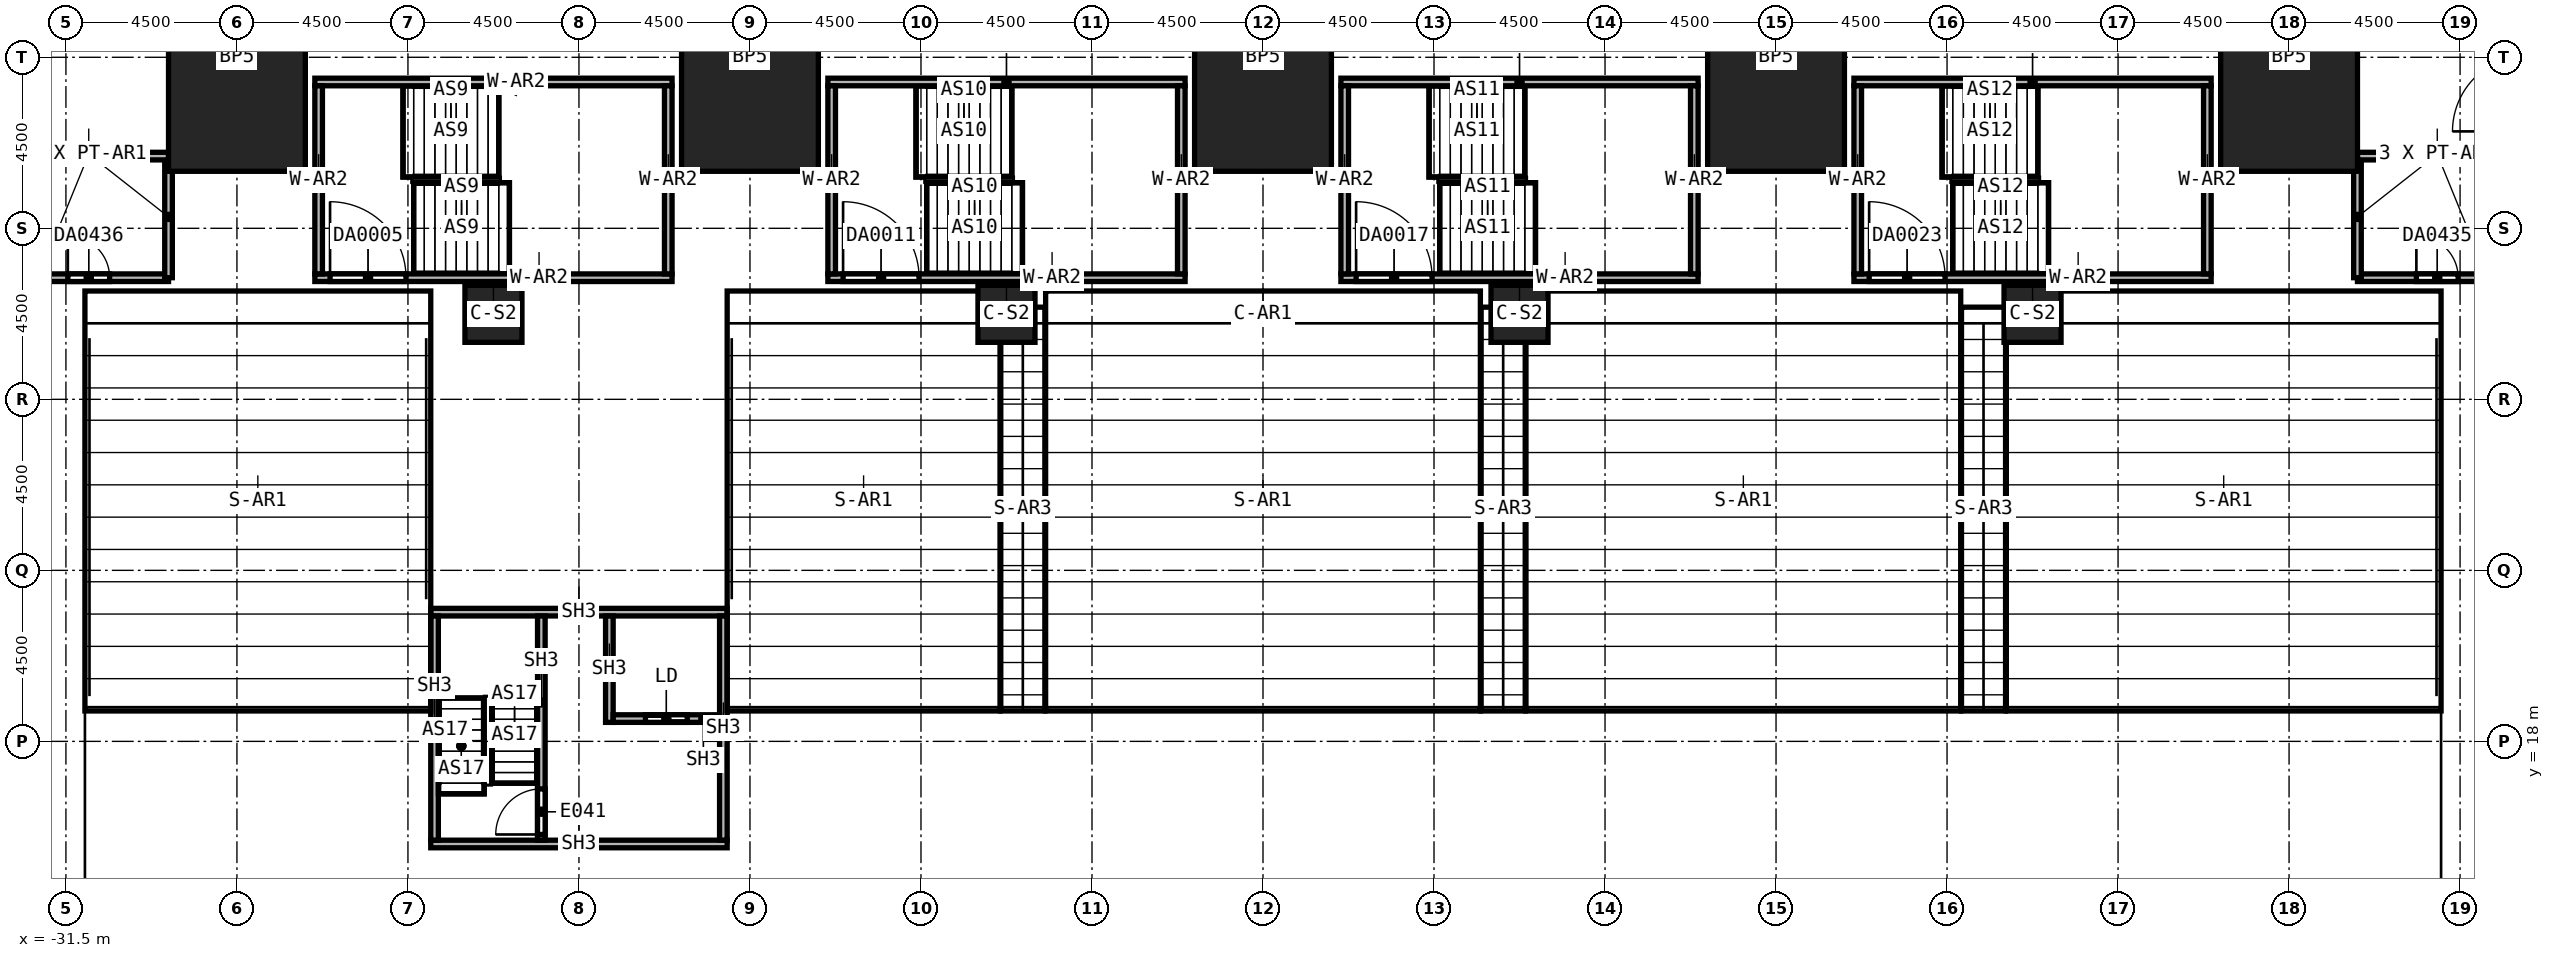
"""IFC4 building model, lengths in metres.
Left out: names, types, materials, properties, quantities, classifications, styles, units other than length and angle.
Written with IfcOpenShell. Run it as: python <this file> out.ifc"""

import sys

from ifc_helpers import new_model, si_unit, direction, frame, frame_2d, origin, origin_2d, place, context, subcontext, project, spatial, rectangle, hollow_rectangle, extrude, element, fill, save


model = new_model("IFC4")
c1 = context("Model", 3, precision=1e-05, world=origin(), true_north=direction((0.0, 1.0)))
c2 = subcontext(c1, "Body", "Model", "MODEL_VIEW")
j1 = project(units=[si_unit("LENGTHUNIT", "METRE"), si_unit("PLANEANGLEUNIT", "RADIAN")], contexts=[c1])
p1 = place(None, origin())
s1 = spatial("IfcSite", under=j1, at=p1, CompositionType="ELEMENT")
p2 = place(p1, origin())
s2 = spatial("IfcBuilding", under=s1, at=p2, CompositionType="ELEMENT")
p3 = place(p2, frame((0.0, 0.0, 31.0)))
s3 = spatial("IfcBuildingStorey", under=s2, at=p3, CompositionType="ELEMENT", Elevation=31.0)
for number, where, z_axis, x_axis in (
    (1, (-27.0, 36.0, 0.0), (0.0, 0.0, 1.0), (1.0, 0.0, 0.0)),
    (2, (-13.5, 36.0, 0.0), (0.0, 0.0, 1.0), (1.0, 0.0, 0.0)),
    (3, (0.0, 36.0, 0.0), (0.0, 0.0, 1.0), (1.0, 0.0, 0.0)),
    (4, (13.5, 36.0, 0.0), (0.0, 0.0, 1.0), (1.0, 0.0, 0.0)),
    (5, (27.0, 36.0, 0.0), (0.0, 0.0, 1.0), (1.0, 0.0, 0.0)),
):
    element("IfcColumn", number, at=place(p3, frame(where, z_axis=z_axis, x_axis=x_axis)), inside=s3, PredefinedType="COLUMN", context=c2, shape_type="SweptSolid", body=[
        extrude(rectangle(XDim=3.6, YDim=6.0, at=origin_2d()), origin(), (0.0, 0.0, 1.0), 6.0),
    ])
for number, where, z_axis, x_axis in (
    (6, (-20.25, 29.25, 0.0), (0.0, 0.0, 1.0), (1.0, 0.0, 0.0)),
    (7, (-6.75, 29.25, 0.0), (0.0, 0.0, 1.0), (1.0, 0.0, 0.0)),
    (8, (6.75, 29.25, 0.0), (0.0, 0.0, 1.0), (1.0, 0.0, 0.0)),
    (9, (20.25, 29.25, 0.0), (0.0, 0.0, 1.0), (1.0, 0.0, 0.0)),
):
    element("IfcColumn", number, at=place(p3, frame(where, z_axis=z_axis, x_axis=x_axis)), inside=s3, PredefinedType="COLUMN", context=c2, shape_type="SweptSolid", body=[
        extrude(rectangle(XDim=1.5, YDim=1.5, at=origin_2d()), origin(), (0.0, 0.0, 1.0), 6.0),
    ])
for number, where, z_axis, x_axis in (
    (10, (-21.9, 15.3, 0.0), (0.0, 0.0, 1.0), (1.0, 0.0, 0.0)),
    (11, (-21.9, 21.4, 0.0), (0.0, 0.0, 1.0), (1.0, 0.0, 0.0)),
):
    element("IfcWall", number, at=place(p3, frame(where, z_axis=z_axis, x_axis=x_axis)), inside=s3, PredefinedType="SOLIDWALL", context=c2, shape_type="SweptSolid", body=[
        extrude(rectangle(XDim=7.8, YDim=0.2, at=frame_2d((3.9, 0.0))), origin(), (0.0, 0.0, 1.0), 5.7),
    ])
for number, where, z_axis, x_axis in (
    (12, (-21.8, 15.4, 0.0), (0.0, 0.0, 1.0), (0.0, 1.0, 0.0)),
    (13, (-14.2, 15.4, 0.0), (0.0, 0.0, 1.0), (0.0, 1.0, 0.0)),
):
    element("IfcWall", number, at=place(p3, frame(where, z_axis=z_axis, x_axis=x_axis)), inside=s3, PredefinedType="SOLIDWALL", context=c2, shape_type="SweptSolid", body=[
        extrude(rectangle(XDim=5.9, YDim=0.2, at=frame_2d((2.95, 0.0))), origin(), (0.0, 0.0, 1.0), 5.7),
    ])
p4 = place(p3, frame((-18.99, 15.4, 0.0), z_axis=(0.0, 0.0, 1.0), x_axis=(0.0, 1.0, 0.0)))
e14 = element("IfcWall", 14, at=p4, inside=s3, PredefinedType="SOLIDWALL", context=c2, shape_type="SweptSolid", body=[
    extrude(rectangle(XDim=5.9, YDim=0.2, at=frame_2d((2.95, 0.0))), origin(), (0.0, 0.0, 1.0), 5.7),
])
p5 = place(p4, frame((0.15, 0.0, 0.0)))
e15 = element("IfcOpeningElement", 15, at=p5, cuts=e14, PredefinedType="OPENING", context=c2, shape_type="SweptSolid", body=[
    extrude(rectangle(XDim=1.2, YDim=2.1, at=frame_2d((0.6, 1.05))), frame((0.0, 0.1, 0.0), z_axis=(0.0, -1.0, 0.0), x_axis=(1.0, 0.0, 0.0)), (0.0, 0.0, 1.0), 0.2),
])
p6 = place(p3, frame((-17.2, 18.5, 0.0), z_axis=(0.0, 0.0, 1.0), x_axis=(0.0, 1.0, 0.0)))
e16 = element("IfcWall", 16, at=p6, inside=s3, PredefinedType="SOLIDWALL", context=c2, shape_type="SweptSolid", body=[
    extrude(rectangle(XDim=2.8, YDim=0.2, at=frame_2d((1.4, 0.0))), origin(), (0.0, 0.0, 1.0), 5.7),
])
p7 = place(p3, frame((-17.1, 18.6, 0.0), z_axis=(0.0, 0.0, 1.0), x_axis=(1.0, 0.0, 0.0)))
e17 = element("IfcWall", 17, at=p7, inside=s3, PredefinedType="SOLIDWALL", context=c2, shape_type="SweptSolid", body=[
    extrude(rectangle(XDim=2.8, YDim=0.2, at=frame_2d((1.4, 0.0))), origin(), (0.0, 0.0, 1.0), 5.7),
])
p8 = place(p7, frame((0.85, 0.0, 0.0)))
e18 = element("IfcOpeningElement", 18, at=p8, cuts=e17, PredefinedType="OPENING", context=c2, shape_type="SweptSolid", body=[
    extrude(rectangle(XDim=1.1, YDim=2.1, at=frame_2d((0.55, 1.05))), frame((0.0, 0.1, 0.0), z_axis=(0.0, -1.0, 0.0), x_axis=(1.0, 0.0, 0.0)), (0.0, 0.0, 1.0), 0.2),
])
p9 = place(p3, frame((0.0, 29.255, 0.0), z_axis=(0.0, 0.0, 1.0), x_axis=(1.0, 0.0, 0.0)))
e19 = element("IfcColumn", 19, at=p9, inside=s3, PredefinedType="COLUMN", context=c2, shape_type="SweptSolid", body=[
    extrude(hollow_rectangle(XDim=0.5, YDim=0.6, WallThickness=0.03, at=origin_2d()), origin(), (0.0, 0.0, 1.0), 5.7),
])
p10 = place(p3, frame((-24.95, 30.2, 0.0), z_axis=(0.0, 0.0, 1.0), x_axis=(1.0, 0.0, 0.0)))
e20 = element("IfcWall", 20, at=p10, inside=s3, PredefinedType="SOLIDWALL", context=c2, shape_type="SweptSolid", body=[
    extrude(rectangle(XDim=9.4, YDim=0.2, at=frame_2d((4.7, 0.0))), origin(), (0.0, 0.0, 1.0), 6.0),
])
p11 = place(p10, frame((0.4, 0.0, 0.0)))
e21 = element("IfcOpeningElement", 21, at=p11, cuts=e20, PredefinedType="OPENING", context=c2, shape_type="SweptSolid", body=[
    extrude(rectangle(XDim=2.0, YDim=2.4, at=frame_2d((1.0, 1.2))), frame((0.0, 0.1, 0.0), z_axis=(0.0, -1.0, 0.0), x_axis=(1.0, 0.0, 0.0)), (0.0, 0.0, 1.0), 0.2),
])
p12 = place(p3, frame((-24.95, 35.35, 0.0), z_axis=(0.0, 0.0, 1.0), x_axis=(1.0, 0.0, 0.0)))
e22 = element("IfcWall", 22, at=p12, inside=s3, PredefinedType="SOLIDWALL", context=c2, shape_type="SweptSolid", body=[
    extrude(rectangle(XDim=9.4, YDim=0.2, at=frame_2d((4.7, 0.0))), origin(), (0.0, 0.0, 1.0), 6.0),
])
for number, where, z_axis, x_axis in (
    (23, (-24.85, 30.3, 0.0), (0.0, 0.0, 1.0), (0.0, 1.0, 0.0)),
    (24, (-15.65, 30.3, 0.0), (0.0, 0.0, 1.0), (0.0, 1.0, 0.0)),
):
    element("IfcWall", number, at=place(p3, frame(where, z_axis=z_axis, x_axis=x_axis)), inside=s3, PredefinedType="SOLIDWALL", context=c2, shape_type="SweptSolid", body=[
        extrude(rectangle(XDim=4.95, YDim=0.2, at=frame_2d((2.475, 0.0))), origin(), (0.0, 0.0, 1.0), 6.0),
    ])
p13 = place(p3, frame((-11.45, 30.2, 0.0), z_axis=(0.0, 0.0, 1.0), x_axis=(1.0, 0.0, 0.0)))
e25 = element("IfcWall", 25, at=p13, inside=s3, PredefinedType="SOLIDWALL", context=c2, shape_type="SweptSolid", body=[
    extrude(rectangle(XDim=9.4, YDim=0.2, at=frame_2d((4.7, 0.0))), origin(), (0.0, 0.0, 1.0), 6.0),
])
p14 = place(p13, frame((0.4, 0.0, 0.0)))
e26 = element("IfcOpeningElement", 26, at=p14, cuts=e25, PredefinedType="OPENING", context=c2, shape_type="SweptSolid", body=[
    extrude(rectangle(XDim=2.0, YDim=2.4, at=frame_2d((1.0, 1.2))), frame((0.0, 0.1, 0.0), z_axis=(0.0, -1.0, 0.0), x_axis=(1.0, 0.0, 0.0)), (0.0, 0.0, 1.0), 0.2),
])
p15 = place(p3, frame((-11.45, 35.35, 0.0), z_axis=(0.0, 0.0, 1.0), x_axis=(1.0, 0.0, 0.0)))
e27 = element("IfcWall", 27, at=p15, inside=s3, PredefinedType="SOLIDWALL", context=c2, shape_type="SweptSolid", body=[
    extrude(rectangle(XDim=9.4, YDim=0.2, at=frame_2d((4.7, 0.0))), origin(), (0.0, 0.0, 1.0), 6.0),
])
for number, where, z_axis, x_axis in (
    (28, (-11.35, 30.3, 0.0), (0.0, 0.0, 1.0), (0.0, 1.0, 0.0)),
    (29, (-2.15, 30.3, 0.0), (0.0, 0.0, 1.0), (0.0, 1.0, 0.0)),
):
    element("IfcWall", number, at=place(p3, frame(where, z_axis=z_axis, x_axis=x_axis)), inside=s3, PredefinedType="SOLIDWALL", context=c2, shape_type="SweptSolid", body=[
        extrude(rectangle(XDim=4.95, YDim=0.2, at=frame_2d((2.475, 0.0))), origin(), (0.0, 0.0, 1.0), 6.0),
    ])
p16 = place(p3, frame((2.05, 30.2, 0.0), z_axis=(0.0, 0.0, 1.0), x_axis=(1.0, 0.0, 0.0)))
e30 = element("IfcWall", 30, at=p16, inside=s3, PredefinedType="SOLIDWALL", context=c2, shape_type="SweptSolid", body=[
    extrude(rectangle(XDim=9.4, YDim=0.2, at=frame_2d((4.7, 0.0))), origin(), (0.0, 0.0, 1.0), 6.0),
])
p17 = place(p16, frame((0.4, 0.0, 0.0)))
e31 = element("IfcOpeningElement", 31, at=p17, cuts=e30, PredefinedType="OPENING", context=c2, shape_type="SweptSolid", body=[
    extrude(rectangle(XDim=2.0, YDim=2.4, at=frame_2d((1.0, 1.2))), frame((0.0, 0.1, 0.0), z_axis=(0.0, -1.0, 0.0), x_axis=(1.0, 0.0, 0.0)), (0.0, 0.0, 1.0), 0.2),
])
p18 = place(p3, frame((2.05, 35.35, 0.0), z_axis=(0.0, 0.0, 1.0), x_axis=(1.0, 0.0, 0.0)))
e32 = element("IfcWall", 32, at=p18, inside=s3, PredefinedType="SOLIDWALL", context=c2, shape_type="SweptSolid", body=[
    extrude(rectangle(XDim=9.4, YDim=0.2, at=frame_2d((4.7, 0.0))), origin(), (0.0, 0.0, 1.0), 6.0),
])
for number, where, z_axis, x_axis in (
    (33, (2.15, 30.3, 0.0), (0.0, 0.0, 1.0), (0.0, 1.0, 0.0)),
    (34, (11.35, 30.3, 0.0), (0.0, 0.0, 1.0), (0.0, 1.0, 0.0)),
):
    element("IfcWall", number, at=place(p3, frame(where, z_axis=z_axis, x_axis=x_axis)), inside=s3, PredefinedType="SOLIDWALL", context=c2, shape_type="SweptSolid", body=[
        extrude(rectangle(XDim=4.95, YDim=0.2, at=frame_2d((2.475, 0.0))), origin(), (0.0, 0.0, 1.0), 6.0),
    ])
p19 = place(p3, frame((15.55, 30.2, 0.0), z_axis=(0.0, 0.0, 1.0), x_axis=(1.0, 0.0, 0.0)))
e35 = element("IfcWall", 35, at=p19, inside=s3, PredefinedType="SOLIDWALL", context=c2, shape_type="SweptSolid", body=[
    extrude(rectangle(XDim=9.4, YDim=0.2, at=frame_2d((4.7, 0.0))), origin(), (0.0, 0.0, 1.0), 6.0),
])
p20 = place(p19, frame((0.4, 0.0, 0.0)))
e36 = element("IfcOpeningElement", 36, at=p20, cuts=e35, PredefinedType="OPENING", context=c2, shape_type="SweptSolid", body=[
    extrude(rectangle(XDim=2.0, YDim=2.4, at=frame_2d((1.0, 1.2))), frame((0.0, 0.1, 0.0), z_axis=(0.0, -1.0, 0.0), x_axis=(1.0, 0.0, 0.0)), (0.0, 0.0, 1.0), 0.2),
])
p21 = place(p3, frame((15.55, 35.35, 0.0), z_axis=(0.0, 0.0, 1.0), x_axis=(1.0, 0.0, 0.0)))
e37 = element("IfcWall", 37, at=p21, inside=s3, PredefinedType="SOLIDWALL", context=c2, shape_type="SweptSolid", body=[
    extrude(rectangle(XDim=9.4, YDim=0.2, at=frame_2d((4.7, 0.0))), origin(), (0.0, 0.0, 1.0), 6.0),
])
for number, where, z_axis, x_axis in (
    (38, (15.65, 30.3, 0.0), (0.0, 0.0, 1.0), (0.0, 1.0, 0.0)),
    (39, (24.85, 30.3, 0.0), (0.0, 0.0, 1.0), (0.0, 1.0, 0.0)),
):
    element("IfcWall", number, at=place(p3, frame(where, z_axis=z_axis, x_axis=x_axis)), inside=s3, PredefinedType="SOLIDWALL", context=c2, shape_type="SweptSolid", body=[
        extrude(rectangle(XDim=4.95, YDim=0.2, at=frame_2d((2.475, 0.0))), origin(), (0.0, 0.0, 1.0), 6.0),
    ])
p22 = place(p3, frame((28.8, 30.2, 0.0), z_axis=(0.0, 0.0, 1.0), x_axis=(1.0, 0.0, 0.0)))
e40 = element("IfcWall", 40, at=p22, inside=s3, PredefinedType="PARTITIONING", context=c2, shape_type="SweptSolid", body=[
    extrude(rectangle(XDim=4.2, YDim=0.2, at=frame_2d((2.1, 0.0))), origin(), (0.0, 0.0, 1.0), 5.7),
])
p23 = place(p22, frame((1.55, 0.0, 0.0)))
e41 = element("IfcOpeningElement", 41, at=p23, cuts=e40, PredefinedType="OPENING", context=c2, shape_type="SweptSolid", body=[
    extrude(rectangle(XDim=1.1, YDim=2.4, at=frame_2d((0.55, 1.2))), frame((0.0, 0.1, 0.0), z_axis=(0.0, -1.0, 0.0), x_axis=(1.0, 0.0, 0.0)), (0.0, 0.0, 1.0), 0.2),
])
p24 = place(p3, frame((28.8, 30.2, 0.0), z_axis=(0.0, 0.0, 1.0), x_axis=(0.0, 1.0, 0.0)))
e42 = element("IfcWall", 42, at=p24, inside=s3, PredefinedType="PARTITIONING", context=c2, shape_type="SweptSolid", body=[
    extrude(rectangle(XDim=3.2, YDim=0.2, at=frame_2d((1.6, 0.0))), origin(), (0.0, 0.0, 1.0), 5.7),
])
p25 = place(p3, frame((28.8, 33.4, 0.0), z_axis=(0.0, 0.0, 1.0), x_axis=(1.0, 0.0, 0.0)))
e43 = element("IfcWall", 43, at=p25, inside=s3, PredefinedType="PARTITIONING", context=c2, shape_type="SweptSolid", body=[
    extrude(rectangle(XDim=4.2, YDim=0.2, at=frame_2d((2.1, 0.0))), origin(), (0.0, 0.0, 1.0), 5.7),
])
p26 = place(p3, frame((-33.0, 30.2, 0.0), z_axis=(0.0, 0.0, 1.0), x_axis=(1.0, 0.0, 0.0)))
e44 = element("IfcWall", 44, at=p26, inside=s3, PredefinedType="PARTITIONING", context=c2, shape_type="SweptSolid", body=[
    extrude(rectangle(XDim=4.2, YDim=0.2, at=frame_2d((2.1, 0.0))), origin(), (0.0, 0.0, 1.0), 5.7),
])
p27 = place(p26, frame((1.55, 0.0, 0.0)))
e45 = element("IfcOpeningElement", 45, at=p27, cuts=e44, PredefinedType="OPENING", context=c2, shape_type="SweptSolid", body=[
    extrude(rectangle(XDim=1.1, YDim=2.4, at=frame_2d((0.55, 1.2))), frame((0.0, 0.1, 0.0), z_axis=(0.0, -1.0, 0.0), x_axis=(1.0, 0.0, 0.0)), (0.0, 0.0, 1.0), 0.2),
])
p28 = place(p3, frame((-28.8, 30.2, 0.0), z_axis=(0.0, 0.0, 1.0), x_axis=(0.0, 1.0, 0.0)))
e46 = element("IfcWall", 46, at=p28, inside=s3, PredefinedType="PARTITIONING", context=c2, shape_type="SweptSolid", body=[
    extrude(rectangle(XDim=3.2, YDim=0.2, at=frame_2d((1.6, 0.0))), origin(), (0.0, 0.0, 1.0), 5.7),
])
p29 = place(p3, frame((-33.0, 33.4, 0.0), z_axis=(0.0, 0.0, 1.0), x_axis=(1.0, 0.0, 0.0)))
e47 = element("IfcWall", 47, at=p29, inside=s3, PredefinedType="PARTITIONING", context=c2, shape_type="SweptSolid", body=[
    extrude(rectangle(XDim=4.2, YDim=0.2, at=frame_2d((2.1, 0.0))), origin(), (0.0, 0.0, 1.0), 5.7),
])
p30 = place(p5, origin())
e48 = element("IfcDoor", 48, at=p30, inside=s3, OperationType="SINGLE_SWING_LEFT", PredefinedType="DOOR", context=c2, shape_type="SweptSolid", body=[
    extrude(rectangle(XDim=1.2, YDim=2.1, at=frame_2d((0.6, 1.05))), frame((0.0, 0.025, 0.0), z_axis=(0.0, -1.0, 0.0), x_axis=(1.0, 0.0, 0.0)), (0.0, 0.0, 1.0), 0.05),
])
fill(e15, e48)
p31 = place(p8, origin())
e49 = element("IfcDoor", 49, at=p31, inside=s3, OperationType="SLIDING_TO_LEFT", PredefinedType="DOOR", context=c2, shape_type="SweptSolid", body=[
    extrude(rectangle(XDim=1.1, YDim=2.1, at=frame_2d((0.55, 1.05))), frame((0.0, 0.025, 0.0), z_axis=(0.0, -1.0, 0.0), x_axis=(1.0, 0.0, 0.0)), (0.0, 0.0, 1.0), 0.05),
])
fill(e18, e49)
p32 = place(p11, origin())
e50 = element("IfcDoor", 50, at=p32, inside=s3, OperationType="DOUBLE_DOOR_SINGLE_SWING", PredefinedType="DOOR", context=c2, shape_type="SweptSolid", body=[
    extrude(rectangle(XDim=2.0, YDim=2.4, at=frame_2d((1.0, 1.2))), frame((0.0, 0.025, 0.0), z_axis=(0.0, -1.0, 0.0), x_axis=(1.0, 0.0, 0.0)), (0.0, 0.0, 1.0), 0.05),
])
fill(e21, e50)
p33 = place(p14, origin())
e51 = element("IfcDoor", 51, at=p33, inside=s3, OperationType="DOUBLE_DOOR_SINGLE_SWING", PredefinedType="DOOR", context=c2, shape_type="SweptSolid", body=[
    extrude(rectangle(XDim=2.0, YDim=2.4, at=frame_2d((1.0, 1.2))), frame((0.0, 0.025, 0.0), z_axis=(0.0, -1.0, 0.0), x_axis=(1.0, 0.0, 0.0)), (0.0, 0.0, 1.0), 0.05),
])
fill(e26, e51)
p34 = place(p17, origin())
e52 = element("IfcDoor", 52, at=p34, inside=s3, OperationType="DOUBLE_DOOR_SINGLE_SWING", PredefinedType="DOOR", context=c2, shape_type="SweptSolid", body=[
    extrude(rectangle(XDim=2.0, YDim=2.4, at=frame_2d((1.0, 1.2))), frame((0.0, 0.025, 0.0), z_axis=(0.0, -1.0, 0.0), x_axis=(1.0, 0.0, 0.0)), (0.0, 0.0, 1.0), 0.05),
])
fill(e31, e52)
p35 = place(p20, origin())
e53 = element("IfcDoor", 53, at=p35, inside=s3, OperationType="DOUBLE_DOOR_SINGLE_SWING", PredefinedType="DOOR", context=c2, shape_type="SweptSolid", body=[
    extrude(rectangle(XDim=2.0, YDim=2.4, at=frame_2d((1.0, 1.2))), frame((0.0, 0.025, 0.0), z_axis=(0.0, -1.0, 0.0), x_axis=(1.0, 0.0, 0.0)), (0.0, 0.0, 1.0), 0.05),
])
fill(e36, e53)
p36 = place(p23, origin())
e54 = element("IfcDoor", 54, at=p36, inside=s3, OperationType="DOUBLE_DOOR_SINGLE_SWING", PredefinedType="DOOR", context=c2, shape_type="SweptSolid", body=[
    extrude(rectangle(XDim=1.1, YDim=2.4, at=frame_2d((0.55, 1.2))), frame((0.0, 0.025, 0.0), z_axis=(0.0, -1.0, 0.0), x_axis=(1.0, 0.0, 0.0)), (0.0, 0.0, 1.0), 0.05),
])
fill(e41, e54)
p37 = place(p27, origin())
e55 = element("IfcDoor", 55, at=p37, inside=s3, OperationType="DOUBLE_DOOR_SINGLE_SWING", PredefinedType="DOOR", context=c2, shape_type="SweptSolid", body=[
    extrude(rectangle(XDim=1.1, YDim=2.4, at=frame_2d((0.55, 1.2))), frame((0.0, 0.025, 0.0), z_axis=(0.0, -1.0, 0.0), x_axis=(1.0, 0.0, 0.0)), (0.0, 0.0, 1.0), 0.05),
])
fill(e45, e55)
save(model, sys.argv[1])
